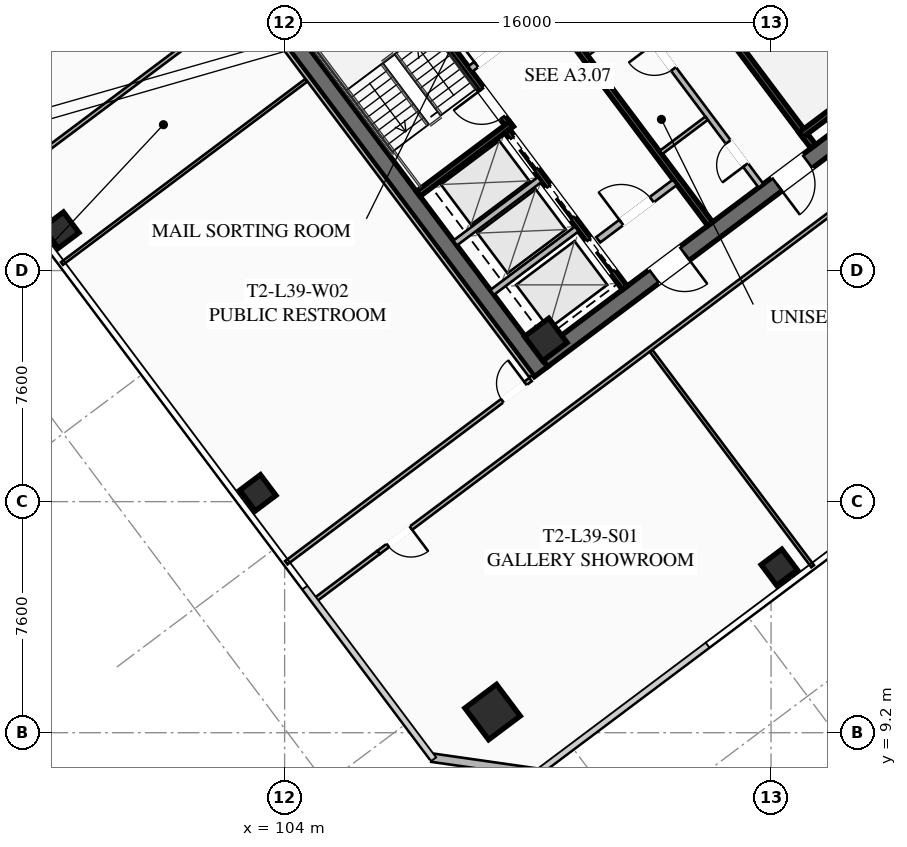
"""IFC4 building model, lengths in metres.
Left out: names, types, materials, properties, quantities, classifications, styles, units other than length and angle.
Written with IfcOpenShell. Run it as: python <this file> out.ifc"""

import sys

from ifc_helpers import new_model, si_unit, direction, frame, frame_2d, origin, origin_2d, place, context, subcontext, project, spatial, rectangle, hollow_rectangle, extrude, element, fill, save


model = new_model("IFC4")
c1 = context("Model", 3, precision=1e-05, world=origin(), true_north=direction((0.0, 1.0)))
c2 = subcontext(c1, "Body", "Model", "MODEL_VIEW")
j1 = project(units=[si_unit("LENGTHUNIT", "METRE"), si_unit("PLANEANGLEUNIT", "RADIAN")], contexts=[c1])
p1 = place(None, origin())
s1 = spatial("IfcSite", under=j1, at=p1, CompositionType="ELEMENT")
p2 = place(p1, origin())
s2 = spatial("IfcBuilding", under=s1, at=p2, CompositionType="ELEMENT")
p3 = place(p2, frame((0.0, 0.0, 146.35)))
s3 = spatial("IfcBuildingStorey", under=s2, at=p3, CompositionType="ELEMENT", Elevation=146.35)
for number, where, z_axis, x_axis in (
    (1, (112.436, 21.077, 0.0), (0.0, 0.0, 1.0), (-0.6, 0.8, 0.0)),
    (2, (115.564, 42.923, 0.0), (0.0, 0.0, 1.0), (0.6, -0.8, 0.0)),
):
    element("IfcWall", number, at=place(p3, frame(where, z_axis=z_axis, x_axis=x_axis)), inside=s3, PredefinedType="SHEAR", context=c2, shape_type="SweptSolid", body=[
        extrude(rectangle(XDim=15.6, YDim=0.55, at=frame_2d((7.8, 0.0))), origin(), (0.0, 0.0, 1.0), 3.55),
    ])
p4 = place(p3, frame((124.539, 30.498, 0.0), z_axis=(0.0, 0.0, 1.0), x_axis=(-0.799998054672, -0.600002593761, 0.0)))
e3 = element("IfcWall", 3, at=p4, inside=s3, PredefinedType="SHEAR", context=c2, shape_type="SweptSolid", body=[
    extrude(rectangle(XDim=15.06, YDim=0.55, at=frame_2d((7.53, 0.0))), origin(), (0.0, 0.0, 1.0), 3.55),
])
p5 = place(p4, frame((9.23, 0.0, 0.0)))
e4 = element("IfcOpeningElement", 4, at=p5, cuts=e3, PredefinedType="OPENING", context=c2, shape_type="SweptSolid", body=[
    extrude(rectangle(XDim=1.25, YDim=2.25, at=frame_2d((0.625, 1.125))), frame((0.0, 0.285, 0.0), z_axis=(0.0, -1.0, 0.0), x_axis=(1.0, 0.0, 0.0)), (0.0, 0.0, 1.0), 0.57),
])
p6 = place(p4, frame((4.18, 0.0, 0.0)))
e5 = element("IfcOpeningElement", 5, at=p6, cuts=e3, PredefinedType="OPENING", context=c2, shape_type="SweptSolid", body=[
    extrude(rectangle(XDim=1.25, YDim=2.25, at=frame_2d((0.625, 1.125))), frame((0.0, 0.285, 0.0), z_axis=(0.0, -1.0, 0.0), x_axis=(1.0, 0.0, 0.0)), (0.0, 0.0, 1.0), 0.57),
])
p7 = place(p3, frame((112.59, 22.13, 0.0), z_axis=(0.0, 0.0, 1.0), x_axis=(0.799999996291, 0.600000004945, 0.0)))
e6 = element("IfcColumn", 6, at=p7, inside=s3, PredefinedType="COLUMN", context=c2, shape_type="SweptSolid", body=[
    extrude(hollow_rectangle(XDim=1.0, YDim=1.0, WallThickness=0.04, at=origin_2d()), origin(), (0.0, 0.0, 1.0), 3.37),
])
p8 = place(p3, frame((110.84, 9.88, 0.0), z_axis=(0.0, 0.0, 1.0), x_axis=(0.799999996291, 0.600000004945, 0.0)))
e7 = element("IfcColumn", 7, at=p8, inside=s3, PredefinedType="COLUMN", context=c2, shape_type="SweptSolid", body=[
    extrude(hollow_rectangle(XDim=1.3, YDim=1.3, WallThickness=0.05, at=origin_2d()), origin(), (0.0, 0.0, 1.0), 3.37),
])
for number, where, z_axis, x_axis in (
    (8, (120.27, 14.64, 0.0), (0.0, 0.0, 1.0), (0.8, 0.6, 0.0)),
    (9, (96.64, 25.73, 0.0), (0.0, 0.0, 1.0), (0.8, 0.6, 0.0)),
    (10, (103.12, 17.09, 0.0), (0.0, 0.0, 1.0), (0.8, 0.6, 0.0)),
):
    element("IfcColumn", number, at=place(p3, frame(where, z_axis=z_axis, x_axis=x_axis)), inside=s3, PredefinedType="COLUMN", context=c2, shape_type="SweptSolid", body=[
        extrude(hollow_rectangle(XDim=0.85, YDim=0.85, WallThickness=0.035, at=origin_2d()), origin(), (0.0, 0.0, 1.0), 3.37),
    ])
p9 = place(p3, frame((112.34, 7.88, 0.0), z_axis=(0.0, 0.0, 1.0), x_axis=(-0.989949493661, 0.141421356237, 0.0)))
e11 = element("IfcWall", 11, at=p9, inside=s3, PredefinedType="SOLIDWALL", context=c2, shape_type="SweptSolid", body=[
    extrude(rectangle(XDim=3.536, YDim=0.28, at=frame_2d((1.768, 0.0))), origin(), (0.0, 0.0, 1.0), 3.37),
])
p10 = place(p3, frame((111.44, 29.08, 0.0), z_axis=(0.0, 0.0, 1.0), x_axis=(-0.59999029481, 0.8000072788, 0.0)))
e12 = element("IfcWall", 12, at=p10, inside=s3, PredefinedType="SHEAR", context=c2, shape_type="SweptSolid", body=[
    extrude(rectangle(XDim=8.05, YDim=0.2, at=frame_2d((4.025, 0.0))), origin(), (0.0, 0.0, 1.0), 3.37),
])
p11 = place(p10, frame((0.45, 0.0, 0.0)))
e13 = element("IfcOpeningElement", 13, at=p11, cuts=e12, PredefinedType="OPENING", context=c2, shape_type="SweptSolid", body=[
    extrude(rectangle(XDim=1.15, YDim=2.2, at=frame_2d((0.575, 1.1))), frame((0.0, 0.11, 0.0), z_axis=(0.0, -1.0, 0.0), x_axis=(1.0, 0.0, 0.0)), (0.0, 0.0, 1.0), 0.22),
])
p12 = place(p3, frame((108.396, 26.922, 0.0), z_axis=(0.0, 0.0, 1.0), x_axis=(0.800015298837, 0.599979601008, 0.0)))
e14 = element("IfcWall", 14, at=p12, inside=s3, PredefinedType="SHEAR", context=c2, shape_type="SweptSolid", body=[
    extrude(rectangle(XDim=3.83, YDim=0.2, at=frame_2d((1.915, 0.0))), origin(), (0.0, 0.0, 1.0), 3.37),
])
p13 = place(p3, frame((116.56, 34.92, 0.0), z_axis=(0.0, 0.0, 1.0), x_axis=(0.59999029481, -0.8000072788, 0.0)))
e15 = element("IfcWall", 15, at=p13, inside=s3, PredefinedType="SHEAR", context=c2, shape_type="SweptSolid", body=[
    extrude(rectangle(XDim=8.05, YDim=0.2, at=frame_2d((4.025, 0.0))), origin(), (0.0, 0.0, 1.0), 3.37),
])
p14 = place(p13, frame((0.45, 0.0, 0.0)))
e16 = element("IfcOpeningElement", 16, at=p14, cuts=e15, PredefinedType="OPENING", context=c2, shape_type="SweptSolid", body=[
    extrude(rectangle(XDim=1.15, YDim=2.2, at=frame_2d((0.575, 1.1))), frame((0.0, 0.11, 0.0), z_axis=(0.0, -1.0, 0.0), x_axis=(1.0, 0.0, 0.0)), (0.0, 0.0, 1.0), 0.22),
])
p15 = place(p3, frame((120.98, 28.86, 0.0), z_axis=(0.0, 0.0, 1.0), x_axis=(0.800015298837, 0.599979601008, 0.0)))
e17 = element("IfcWall", 17, at=p15, inside=s3, PredefinedType="SHEAR", context=c2, shape_type="SweptSolid", body=[
    extrude(rectangle(XDim=3.83, YDim=0.2, at=frame_2d((1.915, 0.0))), origin(), (0.0, 0.0, 1.0), 3.37),
])
p16 = place(p3, frame((117.998, 25.936, 0.0), z_axis=(0.0, 0.0, 1.0), x_axis=(-0.600002693989, 0.799997979501, 0.0)))
e18 = element("IfcWall", 18, at=p16, inside=s3, PredefinedType="SHEAR", context=c2, shape_type="SweptSolid", body=[
    extrude(rectangle(XDim=14.5, YDim=0.2, at=frame_2d((7.25, 0.0))), origin(), (0.0, 0.0, 1.0), 3.37),
])
p17 = place(p3, frame((110.104, 31.028, 0.0), z_axis=(0.0, 0.0, 1.0), x_axis=(0.800018601094, 0.59997519774, 0.0)))
e19 = element("IfcWall", 19, at=p17, inside=s3, PredefinedType="SOLIDWALL", context=c2, shape_type="SweptSolid", body=[
    extrude(rectangle(XDim=3.15, YDim=0.22, at=frame_2d((1.575, 0.0))), origin(), (0.0, 0.0, 1.0), 2.723),
])
p18 = place(p17, frame((0.25, 0.0, 0.0)))
e20 = element("IfcOpeningElement", 20, at=p18, cuts=e19, PredefinedType="OPENING", context=c2, shape_type="SweptSolid", body=[
    extrude(rectangle(XDim=0.95, YDim=2.05, at=frame_2d((0.475, 1.025))), frame((0.0, 0.12, 0.0), z_axis=(0.0, -1.0, 0.0), x_axis=(1.0, 0.0, 0.0)), (0.0, 0.0, 1.0), 0.24),
])
p19 = place(p17, frame((1.95, 0.0, 0.0)))
e21 = element("IfcOpeningElement", 21, at=p19, cuts=e19, PredefinedType="OPENING", context=c2, shape_type="SweptSolid", body=[
    extrude(rectangle(XDim=0.95, YDim=2.05, at=frame_2d((0.475, 1.025))), frame((0.0, 0.12, 0.0), z_axis=(0.0, -1.0, 0.0), x_axis=(1.0, 0.0, 0.0)), (0.0, 0.0, 1.0), 0.24),
])
p20 = place(p3, frame((114.316, 25.412, 0.0), z_axis=(0.0, 0.0, 1.0), x_axis=(0.800018601094, 0.59997519774, 0.0)))
e22 = element("IfcWall", 22, at=p20, inside=s3, PredefinedType="SOLIDWALL", context=c2, shape_type="SweptSolid", body=[
    extrude(rectangle(XDim=3.15, YDim=0.22, at=frame_2d((1.575, 0.0))), origin(), (0.0, 0.0, 1.0), 2.723),
])
p21 = place(p20, frame((0.95, 0.0, 0.0)))
e23 = element("IfcOpeningElement", 23, at=p21, cuts=e22, PredefinedType="OPENING", context=c2, shape_type="SweptSolid", body=[
    extrude(rectangle(XDim=1.25, YDim=2.25, at=frame_2d((0.625, 1.125))), frame((0.0, 0.12, 0.0), z_axis=(0.0, -1.0, 0.0), x_axis=(1.0, 0.0, 0.0)), (0.0, 0.0, 1.0), 0.24),
])
p22 = place(p3, frame((115.19, 23.83, 0.0), z_axis=(0.0, 0.0, 1.0), x_axis=(-0.599993943644, 0.800004542231, 0.0)))
e24 = element("IfcWall", 24, at=p22, inside=s3, PredefinedType="SHEAR", context=c2, shape_type="SweptSolid", body=[
    extrude(rectangle(XDim=6.45, YDim=0.2, at=frame_2d((3.225, 0.0))), origin(), (0.0, 0.0, 1.0), 3.37),
])
p23 = place(p22, frame((4.875, 0.0, 0.0)))
e25 = element("IfcOpeningElement", 25, at=p23, cuts=e24, PredefinedType="OPENING", context=c2, shape_type="SweptSolid", body=[
    extrude(rectangle(XDim=1.3, YDim=2.25, at=frame_2d((0.65, 1.125))), frame((0.0, 0.11, 0.0), z_axis=(0.0, -1.0, 0.0), x_axis=(1.0, 0.0, 0.0)), (0.0, 0.0, 1.0), 0.22),
])
p24 = place(p22, frame((2.875, 0.0, 0.0)))
e26 = element("IfcOpeningElement", 26, at=p24, cuts=e24, PredefinedType="OPENING", context=c2, shape_type="SweptSolid", body=[
    extrude(rectangle(XDim=1.3, YDim=2.25, at=frame_2d((0.65, 1.125))), frame((0.0, 0.11, 0.0), z_axis=(0.0, -1.0, 0.0), x_axis=(1.0, 0.0, 0.0)), (0.0, 0.0, 1.0), 0.22),
])
p25 = place(p22, frame((0.675, 0.0, 0.0)))
e27 = element("IfcOpeningElement", 27, at=p25, cuts=e24, PredefinedType="OPENING", context=c2, shape_type="SweptSolid", body=[
    extrude(rectangle(XDim=1.3, YDim=2.25, at=frame_2d((0.65, 1.125))), frame((0.0, 0.11, 0.0), z_axis=(0.0, -1.0, 0.0), x_axis=(1.0, 0.0, 0.0)), (0.0, 0.0, 1.0), 0.22),
])
for number, where, z_axis, x_axis in (
    (28, (110.826, 23.682, 0.0), (0.0, 0.0, 1.0), (0.8, 0.6, 0.0)),
    (29, (109.608, 25.306, 0.0), (0.0, 0.0, 1.0), (0.8, 0.6, 0.0)),
):
    element("IfcWall", number, at=place(p3, frame(where, z_axis=z_axis, x_axis=x_axis)), inside=s3, PredefinedType="SOLIDWALL", context=c2, shape_type="SweptSolid", body=[
        extrude(rectangle(XDim=3.48, YDim=0.2, at=frame_2d((1.74, 0.0))), origin(), (0.0, 0.0, 1.0), 3.37),
    ])
p26 = place(p3, frame((119.67, 27.19, 0.0), z_axis=(0.0, 0.0, 1.0), x_axis=(-0.599988677396, 0.800008491828, 0.0)))
e30 = element("IfcWall", 30, at=p26, inside=s3, PredefinedType="SOLIDWALL", context=c2, shape_type="SweptSolid", body=[
    extrude(rectangle(XDim=6.9, YDim=0.2, at=frame_2d((3.45, 0.0))), origin(), (0.0, 0.0, 1.0), 2.723),
])
p27 = place(p26, frame((0.85, 0.0, 0.0)))
e31 = element("IfcOpeningElement", 31, at=p27, cuts=e30, PredefinedType="OPENING", context=c2, shape_type="SweptSolid", body=[
    extrude(rectangle(XDim=0.95, YDim=2.05, at=frame_2d((0.475, 1.025))), frame((0.0, 0.11, 0.0), z_axis=(0.0, -1.0, 0.0), x_axis=(1.0, 0.0, 0.0)), (0.0, 0.0, 1.0), 0.22),
])
p28 = place(p26, frame((4.8, 0.0, 0.0)))
e32 = element("IfcOpeningElement", 32, at=p28, cuts=e30, PredefinedType="OPENING", context=c2, shape_type="SweptSolid", body=[
    extrude(rectangle(XDim=1.05, YDim=2.2, at=frame_2d((0.525, 1.1))), frame((0.0, 0.11, 0.0), z_axis=(0.0, -1.0, 0.0), x_axis=(1.0, 0.0, 0.0)), (0.0, 0.0, 1.0), 0.22),
])
for number, where, z_axis, x_axis in (
    (33, (113.946, 31.522, 0.0), (0.0, 0.0, 1.0), (0.8, 0.6, 0.0)),
    (34, (116.376, 28.282, 0.0), (0.0, 0.0, 1.0), (0.8, 0.6, 0.0)),
):
    element("IfcWall", number, at=place(p3, frame(where, z_axis=z_axis, x_axis=x_axis)), inside=s3, PredefinedType="PARTITIONING", context=c2, shape_type="SweptSolid", body=[
        extrude(rectangle(XDim=1.88, YDim=0.135, at=frame_2d((0.94, 0.0))), origin(), (0.0, 0.0, 1.0), 2.723),
    ])
p29 = place(p3, frame((94.778, 31.546, 0.0), z_axis=(0.0, 0.0, 1.0), x_axis=(0.8, 0.6, 0.0)))
e35 = element("IfcWall", 35, at=p29, inside=s3, PredefinedType="PARTITIONING", context=c2, shape_type="SweptSolid", body=[
    extrude(rectangle(XDim=31.3, YDim=0.135, at=frame_2d((15.65, 0.0))), origin(), (0.0, 0.0, 1.0), 2.723),
])
p30 = place(p29, frame((0.3, 0.0, 0.0)))
e36 = element("IfcOpeningElement", 36, at=p30, cuts=e35, PredefinedType="OPENING", context=c2, shape_type="SweptSolid", body=[
    extrude(rectangle(XDim=0.95, YDim=2.05, at=frame_2d((0.475, 1.025))), frame((0.0, 0.077, 0.0), z_axis=(0.0, -1.0, 0.0), x_axis=(1.0, 0.0, 0.0)), (0.0, 0.0, 1.0), 0.155),
])
p31 = place(p29, frame((11.21, 0.0, 0.0)))
e37 = element("IfcOpeningElement", 37, at=p31, cuts=e35, PredefinedType="OPENING", context=c2, shape_type="SweptSolid", body=[
    extrude(rectangle(XDim=0.95, YDim=2.05, at=frame_2d((0.475, 1.025))), frame((0.0, 0.077, 0.0), z_axis=(0.0, -1.0, 0.0), x_axis=(1.0, 0.0, 0.0)), (0.0, 0.0, 1.0), 0.155),
])
p32 = place(p29, frame((15.487, 0.0, 0.0)))
e38 = element("IfcOpeningElement", 38, at=p32, cuts=e35, PredefinedType="OPENING", context=c2, shape_type="SweptSolid", body=[
    extrude(rectangle(XDim=0.95, YDim=2.05, at=frame_2d((0.475, 1.025))), frame((0.0, 0.077, 0.0), z_axis=(0.0, -1.0, 0.0), x_axis=(1.0, 0.0, 0.0)), (0.0, 0.0, 1.0), 0.155),
])
p33 = place(p29, frame((30.05, 0.0, 0.0)))
e39 = element("IfcOpeningElement", 39, at=p33, cuts=e35, PredefinedType="OPENING", context=c2, shape_type="SweptSolid", body=[
    extrude(rectangle(XDim=0.95, YDim=2.05, at=frame_2d((0.475, 1.025))), frame((0.0, 0.077, 0.0), z_axis=(0.0, -1.0, 0.0), x_axis=(1.0, 0.0, 0.0)), (0.0, 0.0, 1.0), 0.155),
])
p34 = place(p3, frame((132.13, 33.91, 0.0), z_axis=(0.0, 0.0, 1.0), x_axis=(-0.799997191971, -0.600003744021, 0.0)))
e40 = element("IfcWall", 40, at=p34, inside=s3, PredefinedType="PARTITIONING", context=c2, shape_type="SweptSolid", body=[
    extrude(rectangle(XDim=31.3, YDim=0.135, at=frame_2d((15.65, 0.0))), origin(), (0.0, 0.0, 1.0), 2.723),
])
p35 = place(p34, frame((29.97, 0.0, 0.0)))
e41 = element("IfcOpeningElement", 41, at=p35, cuts=e40, PredefinedType="OPENING", context=c2, shape_type="SweptSolid", body=[
    extrude(rectangle(XDim=0.95, YDim=2.05, at=frame_2d((0.475, 1.025))), frame((0.0, 0.077, 0.0), z_axis=(0.0, -1.0, 0.0), x_axis=(1.0, 0.0, 0.0)), (0.0, 0.0, 1.0), 0.155),
])
p36 = place(p34, frame((0.38, 0.0, 0.0)))
e42 = element("IfcOpeningElement", 42, at=p36, cuts=e40, PredefinedType="OPENING", context=c2, shape_type="SweptSolid", body=[
    extrude(rectangle(XDim=0.95, YDim=2.05, at=frame_2d((0.475, 1.025))), frame((0.0, 0.077, 0.0), z_axis=(0.0, -1.0, 0.0), x_axis=(1.0, 0.0, 0.0)), (0.0, 0.0, 1.0), 0.155),
])
p37 = place(p3, frame((104.986, 13.552, 0.0), z_axis=(0.0, 0.0, 1.0), x_axis=(0.80002227902, 0.599970293491, 0.0)))
e43 = element("IfcWall", 43, at=p37, inside=s3, PredefinedType="PARTITIONING", context=c2, shape_type="SweptSolid", body=[
    extrude(rectangle(XDim=2.63, YDim=0.135, at=frame_2d((1.315, 0.0))), origin(), (0.0, 0.0, 1.0), 2.723),
])
p38 = place(p3, frame((121.368, 14.676, 0.0), z_axis=(0.0, 0.0, 1.0), x_axis=(-0.599982344389, 0.800013241404, 0.0)))
e44 = element("IfcWall", 44, at=p38, inside=s3, PredefinedType="PARTITIONING", context=c2, shape_type="SweptSolid", body=[
    extrude(rectangle(XDim=8.85, YDim=0.11, at=frame_2d((4.425, 0.0))), origin(), (0.0, 0.0, 1.0), 2.723),
])
p39 = place(p3, frame((112.104, 20.928, 0.0), z_axis=(0.0, 0.0, 1.0), x_axis=(-0.599994940075, 0.800003794918, 0.0)))
e45 = element("IfcWall", 45, at=p39, inside=s3, PredefinedType="PARTITIONING", context=c2, shape_type="SweptSolid", body=[
    extrude(rectangle(XDim=15.44, YDim=0.135, at=frame_2d((7.72, 0.0))), origin(), (0.0, 0.0, 1.0), 2.723),
])
p40 = place(p3, frame((102.728, 33.296, 0.0), z_axis=(0.0, 0.0, 1.0), x_axis=(-0.800002918023, -0.599996109283, 0.0)))
e46 = element("IfcWall", 46, at=p40, inside=s3, PredefinedType="PARTITIONING", context=c2, shape_type="SweptSolid", body=[
    extrude(rectangle(XDim=10.04, YDim=0.135, at=frame_2d((5.02, 0.0))), origin(), (0.0, 0.0, 1.0), 2.723),
])
p41 = place(p40, frame((0.5, 0.0, 0.0)))
e47 = element("IfcOpeningElement", 47, at=p41, cuts=e46, PredefinedType="OPENING", context=c2, shape_type="SweptSolid", body=[
    extrude(rectangle(XDim=0.95, YDim=2.05, at=frame_2d((0.475, 1.025))), frame((0.0, 0.077, 0.0), z_axis=(0.0, -1.0, 0.0), x_axis=(1.0, 0.0, 0.0)), (0.0, 0.0, 1.0), 0.155),
])
p42 = place(p3, frame((104.056, 14.792, 0.0), z_axis=(0.0, 0.0, 1.0), x_axis=(0.800002918023, 0.599996109283, 0.0)))
e48 = element("IfcWall", 48, at=p42, inside=s3, PredefinedType="PARTITIONING", context=c2, shape_type="SweptSolid", body=[
    extrude(rectangle(XDim=10.04, YDim=0.135, at=frame_2d((5.02, 0.0))), origin(), (0.0, 0.0, 1.0), 2.723),
])
p43 = place(p42, frame((8.88, 0.0, 0.0)))
e49 = element("IfcOpeningElement", 49, at=p43, cuts=e48, PredefinedType="OPENING", context=c2, shape_type="SweptSolid", body=[
    extrude(rectangle(XDim=0.95, YDim=2.05, at=frame_2d((0.475, 1.025))), frame((0.0, 0.077, 0.0), z_axis=(0.0, -1.0, 0.0), x_axis=(1.0, 0.0, 0.0)), (0.0, 0.0, 1.0), 0.155),
])
p44 = place(p3, frame((96.676, 24.632, 0.0), z_axis=(0.0, 0.0, 1.0), x_axis=(0.800002918023, 0.599996109283, 0.0)))
e50 = element("IfcWall", 50, at=p44, inside=s3, PredefinedType="PARTITIONING", context=c2, shape_type="SweptSolid", body=[
    extrude(rectangle(XDim=10.04, YDim=0.11, at=frame_2d((5.02, 0.0))), origin(), (0.0, 0.0, 1.0), 2.723),
])
p45 = place(p5, origin())
e51 = element("IfcDoor", 51, at=p45, inside=s3, OperationType="SINGLE_SWING_LEFT", PredefinedType="DOOR", context=c2, shape_type="SweptSolid", body=[
    extrude(rectangle(XDim=1.25, YDim=2.25, at=frame_2d((0.625, 1.125))), frame((0.0, 0.025, 0.0), z_axis=(0.0, -1.0, 0.0), x_axis=(1.0, 0.0, 0.0)), (0.0, 0.0, 1.0), 0.05),
])
fill(e4, e51)
p46 = place(p6, origin())
e52 = element("IfcDoor", 52, at=p46, inside=s3, OperationType="SINGLE_SWING_RIGHT", PredefinedType="DOOR", context=c2, shape_type="SweptSolid", body=[
    extrude(rectangle(XDim=1.25, YDim=2.25, at=frame_2d((0.625, 1.125))), frame((0.0, 0.025, 0.0), z_axis=(0.0, -1.0, 0.0), x_axis=(1.0, 0.0, 0.0)), (0.0, 0.0, 1.0), 0.05),
])
fill(e5, e52)
p47 = place(p11, origin())
e53 = element("IfcDoor", 53, at=p47, inside=s3, OperationType="SINGLE_SWING_RIGHT", PredefinedType="DOOR", context=c2, shape_type="SweptSolid", body=[
    extrude(rectangle(XDim=1.15, YDim=2.2, at=frame_2d((0.575, 1.1))), frame((0.0, 0.025, 0.0), z_axis=(0.0, -1.0, 0.0), x_axis=(1.0, 0.0, 0.0)), (0.0, 0.0, 1.0), 0.05),
])
fill(e13, e53)
p48 = place(p21, origin())
e54 = element("IfcDoor", 54, at=p48, inside=s3, OperationType="SINGLE_SWING_LEFT", PredefinedType="DOOR", context=c2, shape_type="SweptSolid", body=[
    extrude(rectangle(XDim=1.25, YDim=2.25, at=frame_2d((0.625, 1.125))), frame((0.0, 0.025, 0.0), z_axis=(0.0, -1.0, 0.0), x_axis=(1.0, 0.0, 0.0)), (0.0, 0.0, 1.0), 0.05),
])
fill(e23, e54)
p49 = place(p18, origin())
e55 = element("IfcDoor", 55, at=p49, inside=s3, OperationType="SINGLE_SWING_LEFT", PredefinedType="DOOR", context=c2, shape_type="SweptSolid", body=[
    extrude(rectangle(XDim=0.95, YDim=2.05, at=frame_2d((0.475, 1.025))), frame((0.0, 0.025, 0.0), z_axis=(0.0, -1.0, 0.0), x_axis=(1.0, 0.0, 0.0)), (0.0, 0.0, 1.0), 0.05),
])
fill(e20, e55)
p50 = place(p27, origin())
e56 = element("IfcDoor", 56, at=p50, inside=s3, OperationType="SINGLE_SWING_LEFT", PredefinedType="DOOR", context=c2, shape_type="SweptSolid", body=[
    extrude(rectangle(XDim=0.95, YDim=2.05, at=frame_2d((0.475, 1.025))), frame((0.0, 0.025, 0.0), z_axis=(0.0, -1.0, 0.0), x_axis=(1.0, 0.0, 0.0)), (0.0, 0.0, 1.0), 0.05),
])
fill(e31, e56)
p51 = place(p28, origin())
e57 = element("IfcDoor", 57, at=p51, inside=s3, OperationType="SINGLE_SWING_RIGHT", PredefinedType="DOOR", context=c2, shape_type="SweptSolid", body=[
    extrude(rectangle(XDim=1.05, YDim=2.2, at=frame_2d((0.525, 1.1))), frame((0.0, 0.025, 0.0), z_axis=(0.0, -1.0, 0.0), x_axis=(1.0, 0.0, 0.0)), (0.0, 0.0, 1.0), 0.05),
])
fill(e32, e57)
p52 = place(p35, origin())
e58 = element("IfcDoor", 58, at=p52, inside=s3, OperationType="SINGLE_SWING_LEFT", PredefinedType="DOOR", context=c2, shape_type="SweptSolid", body=[
    extrude(rectangle(XDim=0.95, YDim=2.05, at=frame_2d((0.475, 1.025))), frame((0.0, 0.025, 0.0), z_axis=(0.0, -1.0, 0.0), x_axis=(1.0, 0.0, 0.0)), (0.0, 0.0, 1.0), 0.05),
])
fill(e41, e58)
p53 = place(p43, origin())
e59 = element("IfcDoor", 59, at=p53, inside=s3, OperationType="SINGLE_SWING_RIGHT", PredefinedType="DOOR", context=c2, shape_type="SweptSolid", body=[
    extrude(rectangle(XDim=0.95, YDim=2.05, at=frame_2d((0.475, 1.025))), frame((0.0, 0.025, 0.0), z_axis=(0.0, -1.0, 0.0), x_axis=(1.0, 0.0, 0.0)), (0.0, 0.0, 1.0), 0.05),
])
fill(e49, e59)
p54 = place(p23, origin())
e60 = element("IfcDoor", 60, at=p54, inside=s3, OperationType="SLIDING_TO_LEFT", PredefinedType="DOOR", context=c2, shape_type="SweptSolid", body=[
    extrude(rectangle(XDim=1.3, YDim=2.25, at=frame_2d((0.65, 1.125))), frame((0.0, 0.025, 0.0), z_axis=(0.0, -1.0, 0.0), x_axis=(1.0, 0.0, 0.0)), (0.0, 0.0, 1.0), 0.05),
])
fill(e25, e60)
p55 = place(p24, origin())
e61 = element("IfcDoor", 61, at=p55, inside=s3, OperationType="SLIDING_TO_LEFT", PredefinedType="DOOR", context=c2, shape_type="SweptSolid", body=[
    extrude(rectangle(XDim=1.3, YDim=2.25, at=frame_2d((0.65, 1.125))), frame((0.0, 0.025, 0.0), z_axis=(0.0, -1.0, 0.0), x_axis=(1.0, 0.0, 0.0)), (0.0, 0.0, 1.0), 0.05),
])
fill(e26, e61)
p56 = place(p25, origin())
e62 = element("IfcDoor", 62, at=p56, inside=s3, OperationType="SLIDING_TO_LEFT", PredefinedType="DOOR", context=c2, shape_type="SweptSolid", body=[
    extrude(rectangle(XDim=1.3, YDim=2.25, at=frame_2d((0.65, 1.125))), frame((0.0, 0.025, 0.0), z_axis=(0.0, -1.0, 0.0), x_axis=(1.0, 0.0, 0.0)), (0.0, 0.0, 1.0), 0.05),
])
fill(e27, e62)
save(model, sys.argv[1])
